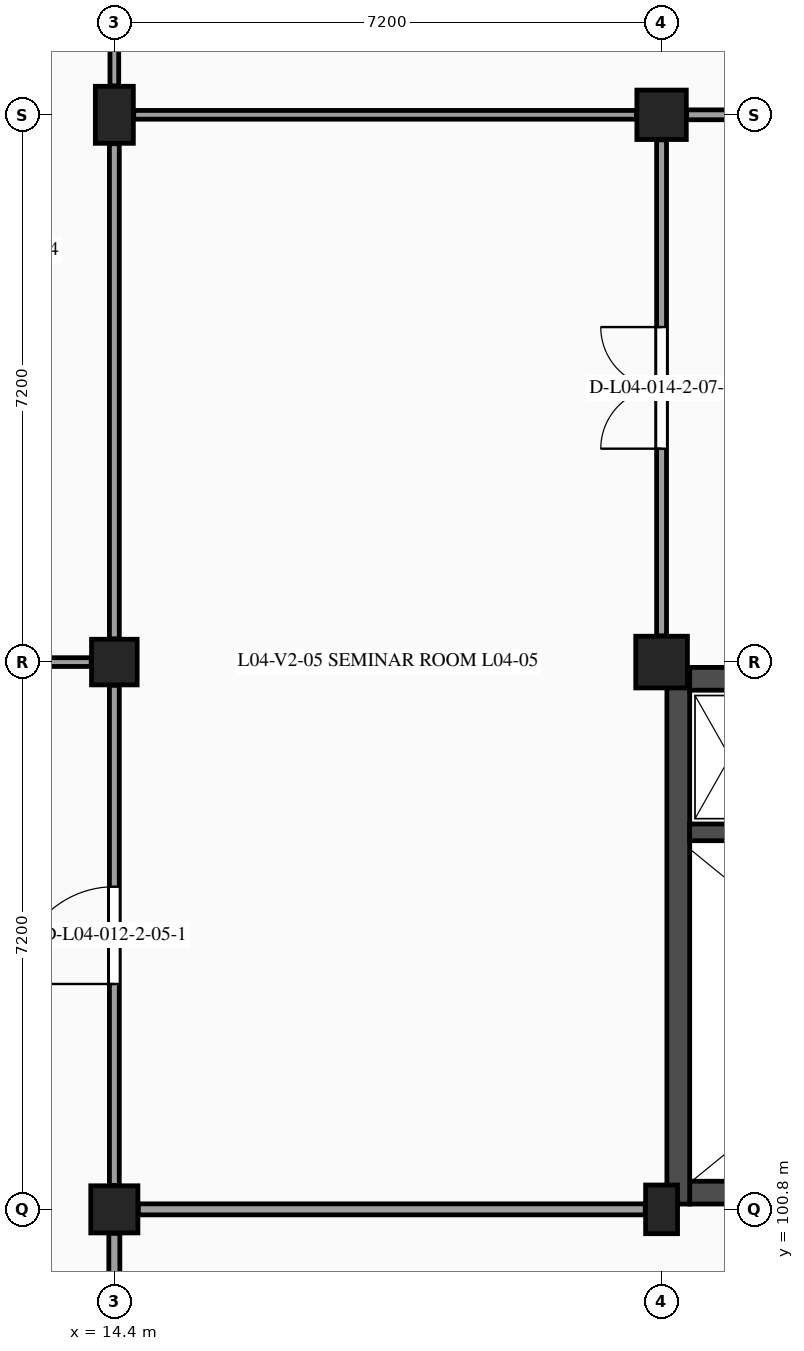
"""IFC4 building model, lengths in metres.
Left out: names, types, materials, properties, quantities, classifications, styles, units other than length and angle.
Written with IfcOpenShell. Run it as: python <this file> out.ifc"""

import sys

from ifc_helpers import new_model, si_unit, direction, frame, frame_2d, origin, origin_2d, place, context, subcontext, project, spatial, rectangle, extrude, element, fill, save


model = new_model("IFC4")
c1 = context("Model", 3, precision=1e-05, world=origin(), true_north=direction((0.0, 1.0)))
c2 = subcontext(c1, "Body", "Model", "MODEL_VIEW")
j1 = project(units=[si_unit("LENGTHUNIT", "METRE"), si_unit("PLANEANGLEUNIT", "RADIAN")], contexts=[c1])
p1 = place(None, origin())
s1 = spatial("IfcSite", under=j1, at=p1, CompositionType="ELEMENT")
p2 = place(p1, origin())
s2 = spatial("IfcBuilding", under=s1, at=p2, CompositionType="ELEMENT")
p3 = place(p2, frame((0.0, 0.0, 18.6)))
s3 = spatial("IfcBuildingStorey", under=s2, at=p3, CompositionType="ELEMENT", Elevation=18.6)
p4 = place(p3, frame((14.4, 100.8, 0.0), z_axis=(0.0, 0.0, 1.0), x_axis=(1.0, 0.0, 0.0)))
e1 = element("IfcColumn", 1, at=p4, inside=s3, PredefinedType="COLUMN", context=c2, shape_type="SweptSolid", body=[
    extrude(rectangle(XDim=0.62, YDim=0.62, at=origin_2d()), origin(), (0.0, 0.0, 1.0), 4.2),
])
p5 = place(p3, frame((14.4, 108.0, 0.0), z_axis=(0.0, 0.0, 1.0), x_axis=(1.0, 0.0, 0.0)))
e2 = element("IfcColumn", 2, at=p5, inside=s3, PredefinedType="COLUMN", context=c2, shape_type="SweptSolid", body=[
    extrude(rectangle(XDim=0.6, YDim=0.6, at=origin_2d()), origin(), (0.0, 0.0, 1.0), 4.2),
])
p6 = place(p3, frame((14.4, 115.2, 0.0), z_axis=(0.0, 0.0, 1.0), x_axis=(1.0, 0.0, 0.0)))
e3 = element("IfcColumn", 3, at=p6, inside=s3, PredefinedType="COLUMN", context=c2, shape_type="SweptSolid", body=[
    extrude(rectangle(XDim=0.5, YDim=0.75, at=origin_2d()), origin(), (0.0, 0.0, 1.0), 4.2),
])
p7 = place(p3, frame((21.6, 100.8, 0.0), z_axis=(0.0, 0.0, 1.0), x_axis=(1.0, 0.0, 0.0)))
e4 = element("IfcColumn", 4, at=p7, inside=s3, PredefinedType="PILASTER", context=c2, shape_type="SweptSolid", body=[
    extrude(rectangle(XDim=0.42, YDim=0.64, at=origin_2d()), origin(), (0.0, 0.0, 1.0), 4.2),
])
p8 = place(p3, frame((21.6, 108.0, 0.0), z_axis=(0.0, 0.0, 1.0), x_axis=(1.0, 0.0, 0.0)))
e5 = element("IfcColumn", 5, at=p8, inside=s3, PredefinedType="COLUMN", context=c2, shape_type="SweptSolid", body=[
    extrude(rectangle(XDim=0.68, YDim=0.68, at=origin_2d()), origin(), (0.0, 0.0, 1.0), 4.2),
])
p9 = place(p3, frame((21.6, 115.2, 0.0), z_axis=(0.0, 0.0, 1.0), x_axis=(1.0, 0.0, 0.0)))
e6 = element("IfcColumn", 6, at=p9, inside=s3, PredefinedType="COLUMN", context=c2, shape_type="SweptSolid", body=[
    extrude(rectangle(XDim=0.65, YDim=0.65, at=origin_2d()), origin(), (0.0, 0.0, 1.0), 4.2),
])
p10 = place(p3, frame((21.97, 101.02, 0.0), z_axis=(0.0, 0.0, 1.0), x_axis=(1.0, 0.0, 0.0)))
e7 = element("IfcWall", 7, at=p10, inside=s3, PredefinedType="SHEAR", context=c2, shape_type="SweptSolid", body=[
    extrude(rectangle(XDim=6.68, YDim=0.3, at=frame_2d((3.34, 0.0))), origin(), (0.0, 0.0, 1.0), 3.955),
])
p11 = place(p3, frame((21.82, 107.93, 0.0), z_axis=(0.0, 0.0, 1.0), x_axis=(0.0, -1.0, 0.0)))
e8 = element("IfcWall", 8, at=p11, inside=s3, PredefinedType="SHEAR", context=c2, shape_type="SweptSolid", body=[
    extrude(rectangle(XDim=7.06, YDim=0.3, at=frame_2d((3.53, 0.0))), origin(), (0.0, 0.0, 1.0), 3.955),
])
p12 = place(p3, frame((21.97, 107.78, 0.0), z_axis=(0.0, 0.0, 1.0), x_axis=(1.0, 0.0, 0.0)))
e9 = element("IfcWall", 9, at=p12, inside=s3, PredefinedType="SHEAR", context=c2, shape_type="SweptSolid", body=[
    extrude(rectangle(XDim=6.68, YDim=0.3, at=frame_2d((3.34, 0.0))), origin(), (0.0, 0.0, 1.0), 3.955),
])
p13 = place(p12, frame((1.42, 0.0, 0.0)))
e10 = element("IfcOpeningElement", 10, at=p13, cuts=e9, PredefinedType="OPENING", context=c2, shape_type="SweptSolid", body=[
    extrude(rectangle(XDim=0.85, YDim=2.1, at=frame_2d((0.425, 1.05))), frame((0.0, 0.16, 0.0), z_axis=(0.0, -1.0, 0.0), x_axis=(1.0, 0.0, 0.0)), (0.0, 0.0, 1.0), 0.32),
])
p14 = place(p12, frame((3.4, 0.0, 0.0)))
e11 = element("IfcOpeningElement", 11, at=p14, cuts=e9, PredefinedType="OPENING", context=c2, shape_type="SweptSolid", body=[
    extrude(rectangle(XDim=0.95, YDim=2.15, at=frame_2d((0.475, 1.075))), frame((0.0, 0.16, 0.0), z_axis=(0.0, -1.0, 0.0), x_axis=(1.0, 0.0, 0.0)), (0.0, 0.0, 1.0), 0.32),
])
p15 = place(p3, frame((21.97, 105.76, 0.0), z_axis=(0.0, 0.0, 1.0), x_axis=(1.0, 0.0, 0.0)))
e12 = element("IfcWall", 12, at=p15, inside=s3, PredefinedType="SHEAR", context=c2, shape_type="SweptSolid", body=[
    extrude(rectangle(XDim=6.68, YDim=0.22, at=frame_2d((3.34, 0.0))), origin(), (0.0, 0.0, 1.0), 3.955),
])
p16 = place(p3, frame((14.4, 93.93, 0.0), z_axis=(0.0, 0.0, 1.0), x_axis=(0.0, 1.0, 0.0)))
e13 = element("IfcWall", 13, at=p16, inside=s3, PredefinedType="PARTITIONING", context=c2, shape_type="SweptSolid", body=[
    extrude(rectangle(XDim=6.555, YDim=0.145, at=frame_2d((3.278, 0.0))), origin(), (0.0, 0.0, 1.0), 3.265),
])
p17 = place(p16, frame((2.478, 0.0, 0.0)))
e14 = element("IfcOpeningElement", 14, at=p17, cuts=e13, PredefinedType="OPENING", context=c2, shape_type="SweptSolid", body=[
    extrude(rectangle(XDim=1.6, YDim=2.2, at=frame_2d((0.8, 1.1))), frame((0.0, 0.083, 0.0), z_axis=(0.0, -1.0, 0.0), x_axis=(1.0, 0.0, 0.0)), (0.0, 0.0, 1.0), 0.165),
])
p18 = place(p3, frame((14.4, 101.115, 0.0), z_axis=(0.0, 0.0, 1.0), x_axis=(0.0, 1.0, 0.0)))
e15 = element("IfcWall", 15, at=p18, inside=s3, PredefinedType="PARTITIONING", context=c2, shape_type="SweptSolid", body=[
    extrude(rectangle(XDim=6.58, YDim=0.13, at=frame_2d((3.29, 0.0))), origin(), (0.0, 0.0, 1.0), 3.26),
])
p19 = place(p18, frame((2.65, 0.0, 0.0)))
e16 = element("IfcOpeningElement", 16, at=p19, cuts=e15, PredefinedType="OPENING", context=c2, shape_type="SweptSolid", body=[
    extrude(rectangle(XDim=1.28, YDim=2.24, at=frame_2d((0.64, 1.12))), frame((0.0, 0.075, 0.0), z_axis=(0.0, -1.0, 0.0), x_axis=(1.0, 0.0, 0.0)), (0.0, 0.0, 1.0), 0.15),
])
p20 = place(p3, frame((7.545, 108.0, 0.0), z_axis=(0.0, 0.0, 1.0), x_axis=(1.0, 0.0, 0.0)))
e17 = element("IfcWall", 17, at=p20, inside=s3, PredefinedType="PARTITIONING", context=c2, shape_type="SweptSolid", body=[
    extrude(rectangle(XDim=6.55, YDim=0.115, at=frame_2d((3.275, 0.0))), origin(), (0.0, 0.0, 1.0), 3.255),
])
p21 = place(p20, frame((2.535, 0.0, 0.0)))
e18 = element("IfcOpeningElement", 18, at=p21, cuts=e17, PredefinedType="OPENING", context=c2, shape_type="SweptSolid", body=[
    extrude(rectangle(XDim=1.48, YDim=2.28, at=frame_2d((0.74, 1.14))), frame((0.0, 0.067, 0.0), z_axis=(0.0, -1.0, 0.0), x_axis=(1.0, 0.0, 0.0)), (0.0, 0.0, 1.0), 0.135),
])
p22 = place(p3, frame((14.4, 108.305, 0.0), z_axis=(0.0, 0.0, 1.0), x_axis=(0.0, 1.0, 0.0)))
e19 = element("IfcWall", 19, at=p22, inside=s3, PredefinedType="PARTITIONING", context=c2, shape_type="SweptSolid", body=[
    extrude(rectangle(XDim=6.515, YDim=0.13, at=frame_2d((3.258, 0.0))), origin(), (0.0, 0.0, 1.0), 3.26),
])
p23 = place(p3, frame((14.4, 115.58, 0.0), z_axis=(0.0, 0.0, 1.0), x_axis=(0.0, 1.0, 0.0)))
e20 = element("IfcWall", 20, at=p23, inside=s3, PredefinedType="PARTITIONING", context=c2, shape_type="SweptSolid", body=[
    extrude(rectangle(XDim=6.495, YDim=0.115, at=frame_2d((3.248, 0.0))), origin(), (0.0, 0.0, 1.0), 3.325),
])
p24 = place(p23, frame((2.698, 0.0, 0.0)))
e21 = element("IfcOpeningElement", 21, at=p24, cuts=e20, PredefinedType="OPENING", context=c2, shape_type="SweptSolid", body=[
    extrude(rectangle(XDim=1.1, YDim=2.15, at=frame_2d((0.55, 1.075))), frame((0.0, 0.067, 0.0), z_axis=(0.0, -1.0, 0.0), x_axis=(1.0, 0.0, 0.0)), (0.0, 0.0, 1.0), 0.135),
])
p25 = place(p3, frame((14.715, 100.8, 0.0), z_axis=(0.0, 0.0, 1.0), x_axis=(1.0, 0.0, 0.0)))
e22 = element("IfcWall", 22, at=p25, inside=s3, PredefinedType="PARTITIONING", context=c2, shape_type="SweptSolid", body=[
    extrude(rectangle(XDim=6.67, YDim=0.145, at=frame_2d((3.335, 0.0))), origin(), (0.0, 0.0, 1.0), 3.295),
])
p26 = place(p3, frame((21.6, 108.345, 0.0), z_axis=(0.0, 0.0, 1.0), x_axis=(0.0, 1.0, 0.0)))
e23 = element("IfcWall", 23, at=p26, inside=s3, PredefinedType="PARTITIONING", context=c2, shape_type="SweptSolid", body=[
    extrude(rectangle(XDim=6.525, YDim=0.13, at=frame_2d((3.263, 0.0))), origin(), (0.0, 0.0, 1.0), 3.26),
])
p27 = place(p26, frame((2.462, 0.0, 0.0)))
e24 = element("IfcOpeningElement", 24, at=p27, cuts=e23, PredefinedType="OPENING", context=c2, shape_type="SweptSolid", body=[
    extrude(rectangle(XDim=1.6, YDim=2.2, at=frame_2d((0.8, 1.1))), frame((0.0, 0.075, 0.0), z_axis=(0.0, -1.0, 0.0), x_axis=(1.0, 0.0, 0.0)), (0.0, 0.0, 1.0), 0.15),
])
p28 = place(p3, frame((14.655, 115.2, 0.0), z_axis=(0.0, 0.0, 1.0), x_axis=(1.0, 0.0, 0.0)))
e25 = element("IfcWall", 25, at=p28, inside=s3, PredefinedType="PARTITIONING", context=c2, shape_type="SweptSolid", body=[
    extrude(rectangle(XDim=6.615, YDim=0.115, at=frame_2d((3.308, 0.0))), origin(), (0.0, 0.0, 1.0), 3.295),
])
p29 = place(p3, frame((21.93, 115.2, 0.0), z_axis=(0.0, 0.0, 1.0), x_axis=(1.0, 0.0, 0.0)))
e26 = element("IfcWall", 26, at=p29, inside=s3, PredefinedType="PARTITIONING", context=c2, shape_type="SweptSolid", body=[
    extrude(rectangle(XDim=6.615, YDim=0.13, at=frame_2d((3.308, 0.0))), origin(), (0.0, 0.0, 1.0), 3.305),
])
p30 = place(p19, origin())
e27 = element("IfcDoor", 27, at=p30, inside=s3, OperationType="SINGLE_SWING_LEFT", PredefinedType="DOOR", context=c2, shape_type="SweptSolid", body=[
    extrude(rectangle(XDim=1.28, YDim=2.24, at=frame_2d((0.64, 1.12))), frame((0.0, 0.025, 0.0), z_axis=(0.0, -1.0, 0.0), x_axis=(1.0, 0.0, 0.0)), (0.0, 0.0, 1.0), 0.05),
])
fill(e16, e27)
p31 = place(p27, origin())
e28 = element("IfcDoor", 28, at=p31, inside=s3, OperationType="DOUBLE_DOOR_SINGLE_SWING", PredefinedType="DOOR", context=c2, shape_type="SweptSolid", body=[
    extrude(rectangle(XDim=1.6, YDim=2.2, at=frame_2d((0.8, 1.1))), frame((0.0, 0.025, 0.0), z_axis=(0.0, -1.0, 0.0), x_axis=(1.0, 0.0, 0.0)), (0.0, 0.0, 1.0), 0.05),
])
fill(e24, e28)
save(model, sys.argv[1])
